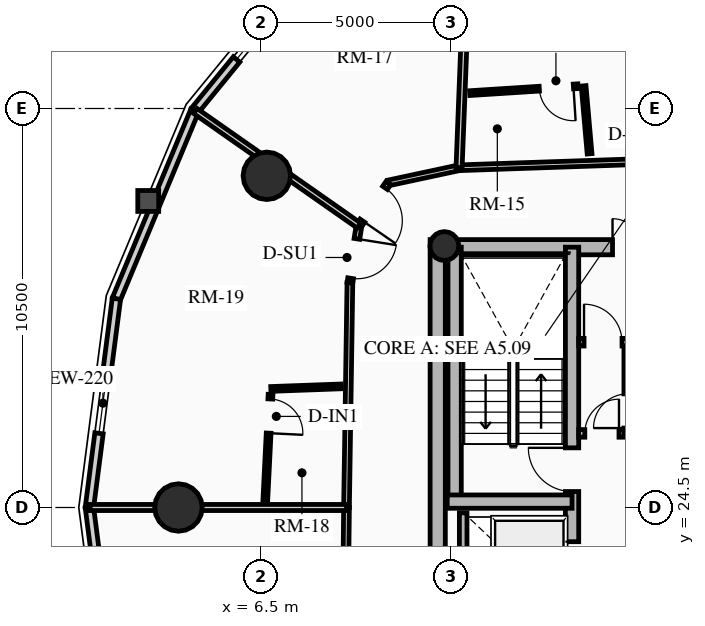
"""IFC4 building model, lengths in metres.
Left out: names, types, materials, properties, quantities, classifications, styles, units other than length and angle.
Written with IfcOpenShell. Run it as: python <this file> out.ifc"""

import sys

from ifc_helpers import new_model, si_unit, direction, frame, frame_2d, origin, origin_2d, place, context, subcontext, project, spatial, rectangle, circle, hollow_circle, extrude, source, transform, mapped, element, fill, save


model = new_model("IFC4")
c1 = context("Model", 3, precision=1e-05, world=origin(), true_north=direction((0.0, 1.0)))
c2 = subcontext(c1, "Body", "Model", "MODEL_VIEW")
j1 = project(units=[si_unit("LENGTHUNIT", "METRE"), si_unit("PLANEANGLEUNIT", "RADIAN")], contexts=[c1])
p1 = place(None, origin())
s1 = spatial("IfcSite", under=j1, at=p1, CompositionType="ELEMENT")
p2 = place(p1, origin())
s2 = spatial("IfcBuilding", under=s1, at=p2, CompositionType="ELEMENT")
p3 = place(p2, frame((0.0, 0.0, 154.51)))
s3 = spatial("IfcBuildingStorey", under=s2, at=p3, CompositionType="ELEMENT", Elevation=154.51)
p4 = place(p3, frame((11.15, 17.45, 0.0), z_axis=(0.0, 0.0, 1.0), x_axis=(0.0, 1.0, 0.0)))
e1 = element("IfcWall", 1, at=p4, inside=s3, PredefinedType="SHEAR", context=c2, shape_type="SweptSolid", body=[
    extrude(rectangle(XDim=14.1, YDim=0.4, at=frame_2d((7.05, 0.0))), origin(), (0.0, 0.0, 1.0), 2.91),
])
p5 = place(p3, frame((11.15, 31.35, 0.0), z_axis=(0.0, 0.0, 1.0), x_axis=(1.0, 0.0, 0.0)))
e2 = element("IfcWall", 2, at=p5, inside=s3, PredefinedType="SHEAR", context=c2, shape_type="SweptSolid", body=[
    extrude(rectangle(XDim=10.7, YDim=0.4, at=frame_2d((5.35, 0.0))), origin(), (0.0, 0.0, 1.0), 2.91),
])
m1 = source(origin(), c2, "Body", "SweptSolid", [
    extrude(rectangle(XDim=1.5, YDim=2.02, at=frame_2d((0.75, 1.01))), frame((0.0, 0.21, 0.0), z_axis=(0.0, -1.0, 0.0), x_axis=(1.0, 0.0, 0.0)), (0.0, 0.0, 1.0), 0.42),
])
p6 = place(p5, frame((4.6, 0.0, 0.0)))
e3 = element("IfcOpeningElement", 3, at=p6, cuts=e2, PredefinedType="OPENING", context=c2, shape_type="MappedRepresentation", body=[
    mapped(m1, transform((0.0, 0.0, 0.0), x_axis=(1.0, 0.0, 0.0), y_axis=(0.0, 1.0, 0.0), z_axis=(0.0, 0.0, 1.0), scale=1.0)),
])
p7 = place(p3, frame((14.685, 17.65, 0.0), z_axis=(0.0, 0.0, 1.0), x_axis=(0.0, 1.0, 0.0)))
e4 = element("IfcWall", 4, at=p7, inside=s3, PredefinedType="SHEAR", context=c2, shape_type="SweptSolid", body=[
    extrude(rectangle(XDim=13.7, YDim=0.35, at=frame_2d((6.85, 0.0))), origin(), (0.0, 0.0, 1.0), 2.91),
])
m2 = source(origin(), c2, "Body", "SweptSolid", [
    extrude(rectangle(XDim=1.1, YDim=2.015, at=frame_2d((0.55, 1.007))), frame((0.0, 0.185, 0.0), z_axis=(0.0, -1.0, 0.0), x_axis=(1.0, 0.0, 0.0)), (0.0, 0.0, 1.0), 0.37),
])
p8 = place(p7, frame((4.85, 0.0, 0.0)))
e5 = element("IfcOpeningElement", 5, at=p8, cuts=e4, PredefinedType="OPENING", context=c2, shape_type="MappedRepresentation", body=[
    mapped(m2, transform((0.0, 0.0, 0.0), x_axis=(1.0, 0.0, 0.0), y_axis=(0.0, 1.0, 0.0), z_axis=(0.0, 0.0, 1.0), scale=1.0)),
])
p9 = place(p7, frame((0.625, 0.0, 0.0)))
e6 = element("IfcOpeningElement", 6, at=p9, cuts=e4, PredefinedType="OPENING", context=c2, shape_type="MappedRepresentation", body=[
    mapped(m2, transform((0.0, 0.0, 0.0), x_axis=(1.0, 0.0, 0.0), y_axis=(0.0, 1.0, 0.0), z_axis=(0.0, 0.0, 1.0), scale=1.0)),
])
p10 = place(p7, frame((2.625, 0.0, 0.0)))
e7 = element("IfcOpeningElement", 7, at=p10, cuts=e4, PredefinedType="OPENING", context=c2, shape_type="MappedRepresentation", body=[
    mapped(m2, transform((0.0, 0.0, 0.0), x_axis=(1.0, 0.0, 0.0), y_axis=(0.0, 1.0, 0.0), z_axis=(0.0, 0.0, 1.0), scale=1.0)),
])
m3 = source(origin(), c2, "Body", "SweptSolid", [
    extrude(rectangle(XDim=1.15, YDim=2.02, at=frame_2d((0.575, 1.01))), frame((0.0, 0.185, 0.0), z_axis=(0.0, -1.0, 0.0), x_axis=(1.0, 0.0, 0.0)), (0.0, 0.0, 1.0), 0.37),
])
p11 = place(p7, frame((7.27, 0.0, 0.0)))
e8 = element("IfcOpeningElement", 8, at=p11, cuts=e4, PredefinedType="OPENING", context=c2, shape_type="MappedRepresentation", body=[
    mapped(m3, transform((0.0, 0.0, 0.0), x_axis=(1.0, 0.0, 0.0), y_axis=(0.0, 1.0, 0.0), z_axis=(0.0, 0.0, 1.0), scale=1.0)),
])
p12 = place(p3, frame((11.595, 24.655, 0.0), z_axis=(0.0, 0.0, 1.0), x_axis=(0.0, 1.0, 0.0)))
e9 = element("IfcWall", 9, at=p12, inside=s3, PredefinedType="SHEAR", context=c2, shape_type="SweptSolid", body=[
    extrude(rectangle(XDim=6.695, YDim=0.35, at=frame_2d((3.348, 0.0))), origin(), (0.0, 0.0, 1.0), 2.91),
])
p13 = place(p3, frame((11.4, 24.655, 0.0), z_axis=(0.0, 0.0, 1.0), x_axis=(1.0, 0.0, 0.0)))
e10 = element("IfcWall", 10, at=p13, inside=s3, PredefinedType="SHEAR", context=c2, shape_type="SweptSolid", body=[
    extrude(rectangle(XDim=3.285, YDim=0.35, at=frame_2d((1.643, 0.0))), origin(), (0.0, 0.0, 1.0), 2.91),
])
p14 = place(p3, frame((11.325, 31.38, 0.0), z_axis=(0.0, 0.0, 1.0), x_axis=(1.0, 0.0, 0.0)))
e11 = element("IfcColumn", 11, at=p14, inside=s3, PredefinedType="COLUMN", context=c2, shape_type="SweptSolid", body=[
    extrude(hollow_circle(Radius=0.38, WallThickness=0.032, at=origin_2d()), origin(), (0.0, 0.0, 1.0), 2.91),
])
for number, where, z_axis, x_axis in (
    (12, (6.653, 33.229, 0.0), (0.0, 0.0, 1.0), (1.0, 0.0, 0.0)),
    (13, (4.328, 24.5, 0.0), (0.0, 0.0, 1.0), (1.0, 0.0, 0.0)),
):
    element("IfcColumn", number, at=place(p3, frame(where, z_axis=z_axis, x_axis=x_axis)), inside=s3, PredefinedType="USERDEFINED", context=c2, shape_type="SweptSolid", body=[
        extrude(circle(Radius=0.625, at=origin_2d()), origin(), (0.0, 0.0, 1.0), 2.91),
    ])
p15 = place(p3, frame((4.757, 34.945, 0.0), z_axis=(0.0, 0.0, 1.0), x_axis=(0.632598524901, 0.774479894053, 0.0)))
e14 = element("IfcWall", 14, at=p15, inside=s3, PredefinedType="SOLIDWALL", context=c2, shape_type="SweptSolid", body=[
    extrude(rectangle(XDim=5.076, YDim=0.22, at=frame_2d((2.538, 0.0))), origin(), (0.0, 0.0, 1.0), 2.245),
])
m4 = source(origin(), c2, "Body", "SweptSolid", [
    extrude(rectangle(XDim=1.6, YDim=1.3, at=frame_2d((0.8, 0.65))), frame((0.0, 0.12, 0.0), z_axis=(0.0, -1.0, 0.0), x_axis=(1.0, 0.0, 0.0)), (0.0, 0.0, 1.0), 0.24),
])
p16 = place(p15, frame((1.738, 0.0, 0.65)))
e15 = element("IfcOpeningElement", 15, at=p16, cuts=e14, PredefinedType="OPENING", context=c2, shape_type="MappedRepresentation", body=[
    mapped(m4, transform((0.0, 0.0, 0.0), x_axis=(1.0, 0.0, 0.0), y_axis=(0.0, 1.0, 0.0), z_axis=(0.0, 0.0, 1.0), scale=1.0)),
])
p17 = place(p3, frame((2.695, 29.991, 0.0), z_axis=(0.0, 0.0, 1.0), x_axis=(0.384259959969, 0.923224936386, 0.0)))
e16 = element("IfcWall", 16, at=p17, inside=s3, PredefinedType="SOLIDWALL", context=c2, shape_type="SweptSolid", body=[
    extrude(rectangle(XDim=5.365, YDim=0.22, at=frame_2d((2.683, 0.0))), origin(), (0.0, 0.0, 1.0), 2.245),
])
p18 = place(p3, frame((1.985, 24.5, 0.0), z_axis=(0.0, 0.0, 1.0), x_axis=(0.128266533912, 0.991739732126, 0.0)))
e17 = element("IfcWall", 17, at=p18, inside=s3, PredefinedType="SOLIDWALL", context=c2, shape_type="SweptSolid", body=[
    extrude(rectangle(XDim=5.537, YDim=0.22, at=frame_2d((2.769, 0.0))), origin(), (0.0, 0.0, 1.0), 2.245),
])
p19 = place(p18, frame((1.968, 0.0, 0.65)))
e18 = element("IfcOpeningElement", 18, at=p19, cuts=e17, PredefinedType="OPENING", context=c2, shape_type="MappedRepresentation", body=[
    mapped(m4, transform((0.0, 0.0, 0.0), x_axis=(1.0, 0.0, 0.0), y_axis=(0.0, 1.0, 0.0), z_axis=(0.0, 0.0, 1.0), scale=1.0)),
])
p20 = place(p3, frame((2.695, 19.009, 0.0), z_axis=(0.0, 0.0, 1.0), x_axis=(-0.128266533912, 0.991739732126, 0.0)))
e19 = element("IfcWall", 19, at=p20, inside=s3, PredefinedType="SOLIDWALL", context=c2, shape_type="SweptSolid", body=[
    extrude(rectangle(XDim=5.537, YDim=0.22, at=frame_2d((2.769, 0.0))), origin(), (0.0, 0.0, 1.0), 2.245),
])
p21 = place(p3, frame((11.82, 21.92, 0.0), z_axis=(0.0, 0.0, 1.0), x_axis=(0.0, 1.0, 0.0)))
e20 = element("IfcWall", 20, at=p21, inside=s3, PredefinedType="SHEAR", context=c2, shape_type="SweptSolid", body=[
    extrude(rectangle(XDim=2.44, YDim=0.2, at=frame_2d((1.22, 0.0))), origin(), (0.0, 0.0, 1.0), 2.91),
])
p22 = place(p3, frame((14.86, 26.45, 0.0), z_axis=(0.0, 0.0, 1.0), x_axis=(1.0, 0.0, 0.0)))
e21 = element("IfcWall", 21, at=p22, inside=s3, PredefinedType="PARTITIONING", context=c2, shape_type="SweptSolid", body=[
    extrude(rectangle(XDim=3.28, YDim=0.2, at=frame_2d((1.64, 0.0))), origin(), (0.0, 0.0, 1.0), 2.675),
])
m5 = source(origin(), c2, "Body", "SweptSolid", [
    extrude(rectangle(XDim=0.9, YDim=2.005, at=frame_2d((0.45, 1.002))), frame((0.0, 0.11, 0.0), z_axis=(0.0, -1.0, 0.0), x_axis=(1.0, 0.0, 0.0)), (0.0, 0.0, 1.0), 0.22),
])
p23 = place(p22, frame((0.16, 0.0, 0.0)))
e22 = element("IfcOpeningElement", 22, at=p23, cuts=e21, PredefinedType="OPENING", context=c2, shape_type="MappedRepresentation", body=[
    mapped(m5, transform((0.0, 0.0, 0.0), x_axis=(1.0, 0.0, 0.0), y_axis=(0.0, 1.0, 0.0), z_axis=(0.0, 0.0, 1.0), scale=1.0)),
])
p24 = place(p3, frame((16.15, 26.45, 0.0), z_axis=(0.0, 0.0, 1.0), x_axis=(0.0, 1.0, 0.0)))
e23 = element("IfcWall", 23, at=p24, inside=s3, PredefinedType="PARTITIONING", context=c2, shape_type="SweptSolid", body=[
    extrude(rectangle(XDim=2.4, YDim=0.2, at=frame_2d((1.2, 0.0))), origin(), (0.0, 0.0, 1.0), 2.675),
])
p25 = place(p24, frame((0.14, 0.0, 0.0)))
e24 = element("IfcOpeningElement", 24, at=p25, cuts=e23, PredefinedType="OPENING", context=c2, shape_type="MappedRepresentation", body=[
    mapped(m5, transform((0.0, 0.0, 0.0), x_axis=(1.0, 0.0, 0.0), y_axis=(0.0, 1.0, 0.0), z_axis=(0.0, 0.0, 1.0), scale=1.0)),
])
p26 = place(p3, frame((14.86, 28.85, 0.0), z_axis=(0.0, 0.0, 1.0), x_axis=(1.0, 0.0, 0.0)))
e25 = element("IfcWall", 25, at=p26, inside=s3, PredefinedType="PARTITIONING", context=c2, shape_type="SweptSolid", body=[
    extrude(rectangle(XDim=3.28, YDim=0.2, at=frame_2d((1.64, 0.0))), origin(), (0.0, 0.0, 1.0), 2.675),
])
m6 = source(origin(), c2, "Body", "SweptSolid", [
    extrude(rectangle(XDim=1.0, YDim=2.015, at=frame_2d((0.5, 1.007))), frame((0.0, 0.11, 0.0), z_axis=(0.0, -1.0, 0.0), x_axis=(1.0, 0.0, 0.0)), (0.0, 0.0, 1.0), 0.22),
])
p27 = place(p26, frame((0.14, 0.0, 0.0)))
e26 = element("IfcOpeningElement", 26, at=p27, cuts=e25, PredefinedType="OPENING", context=c2, shape_type="MappedRepresentation", body=[
    mapped(m6, transform((0.0, 0.0, 0.0), x_axis=(1.0, 0.0, 0.0), y_axis=(0.0, 1.0, 0.0), z_axis=(0.0, 0.0, 1.0), scale=1.0)),
])
p28 = place(p26, frame((2.05, 0.0, 0.0)))
e27 = element("IfcOpeningElement", 27, at=p28, cuts=e25, PredefinedType="OPENING", context=c2, shape_type="MappedRepresentation", body=[
    mapped(m5, transform((0.0, 0.0, 0.0), x_axis=(1.0, 0.0, 0.0), y_axis=(0.0, 1.0, 0.0), z_axis=(0.0, 0.0, 1.0), scale=1.0)),
])
p29 = place(p3, frame((18.112, 33.659, 0.0), z_axis=(0.0, 0.0, 1.0), x_axis=(-0.999413895918, -0.034232508622, 0.0)))
e28 = element("IfcWall", 28, at=p29, inside=s3, PredefinedType="PARTITIONING", context=c2, shape_type="SweptSolid", body=[
    extrude(rectangle(XDim=6.404, YDim=0.15, at=frame_2d((3.202, 0.0))), origin(), (0.0, 0.0, 1.0), 2.245),
])
p30 = place(p3, frame((11.712, 33.44, 0.0), z_axis=(0.0, 0.0, 1.0), x_axis=(-0.977753514213, -0.209757158265, 0.0)))
e29 = element("IfcWall", 29, at=p30, inside=s3, PredefinedType="PARTITIONING", context=c2, shape_type="SweptSolid", body=[
    extrude(rectangle(XDim=1.901, YDim=0.15, at=frame_2d((0.95, 0.0))), origin(), (0.0, 0.0, 1.0), 2.245),
])
p31 = place(p3, frame((9.853, 33.042, 0.0), z_axis=(0.0, 0.0, 1.0), x_axis=(-0.567189283521, -0.823587467522, 0.0)))
e30 = element("IfcWall", 30, at=p31, inside=s3, PredefinedType="PARTITIONING", context=c2, shape_type="SweptSolid", body=[
    extrude(rectangle(XDim=1.365, YDim=0.15, at=frame_2d((0.682, 0.0))), origin(), (0.0, 0.0, 1.0), 2.245),
])
m7 = source(origin(), c2, "Body", "SweptSolid", [
    extrude(rectangle(XDim=1.05, YDim=2.015, at=frame_2d((0.525, 1.007))), frame((0.0, 0.085, 0.0), z_axis=(0.0, -1.0, 0.0), x_axis=(1.0, 0.0, 0.0)), (0.0, 0.0, 1.0), 0.17),
])
p32 = place(p31, frame((0.157, 0.0, 0.0)))
e31 = element("IfcOpeningElement", 31, at=p32, cuts=e30, PredefinedType="OPENING", context=c2, shape_type="MappedRepresentation", body=[
    mapped(m7, transform((0.0, 0.0, 0.0), x_axis=(1.0, 0.0, 0.0), y_axis=(0.0, 1.0, 0.0), z_axis=(0.0, 0.0, 1.0), scale=1.0)),
])
p33 = place(p3, frame((9.079, 31.918, 0.0), z_axis=(0.0, 0.0, 1.0), x_axis=(-0.15742775293, -0.987530507178, 0.0)))
e32 = element("IfcWall", 32, at=p33, inside=s3, PredefinedType="PARTITIONING", context=c2, shape_type="SweptSolid", body=[
    extrude(rectangle(XDim=1.523, YDim=0.15, at=frame_2d((0.761, 0.0))), origin(), (0.0, 0.0, 1.0), 2.245),
])
p34 = place(p33, frame((0.353, 0.0, 0.0)))
e33 = element("IfcOpeningElement", 33, at=p34, cuts=e32, PredefinedType="OPENING", context=c2, shape_type="MappedRepresentation", body=[
    mapped(m7, transform((0.0, 0.0, 0.0), x_axis=(1.0, 0.0, 0.0), y_axis=(0.0, 1.0, 0.0), z_axis=(0.0, 0.0, 1.0), scale=1.0)),
])
p35 = place(p3, frame((8.84, 30.414, 0.0), z_axis=(0.0, 0.0, 1.0), x_axis=(-0.01514915101, -0.999885245027, 0.0)))
e34 = element("IfcWall", 34, at=p35, inside=s3, PredefinedType="PARTITIONING", context=c2, shape_type="SweptSolid", body=[
    extrude(rectangle(XDim=5.915, YDim=0.15, at=frame_2d((2.957, 0.0))), origin(), (0.0, 0.0, 1.0), 2.675),
])
p36 = place(p3, frame((8.75, 24.5, 0.0), z_axis=(0.0, 0.0, 1.0), x_axis=(-0.01076642715, -0.999942040344, 0.0)))
e35 = element("IfcWall", 35, at=p36, inside=s3, PredefinedType="PARTITIONING", context=c2, shape_type="SweptSolid", body=[
    extrude(rectangle(XDim=6.032, YDim=0.15, at=frame_2d((3.016, 0.0))), origin(), (0.0, 0.0, 1.0), 2.245),
])
p37 = place(p3, frame((11.712, 33.44, 0.0), z_axis=(0.0, 0.0, 1.0), x_axis=(0.038892064024, 0.999243417469, 0.0)))
e36 = element("IfcWall", 36, at=p37, inside=s3, PredefinedType="PARTITIONING", context=c2, shape_type="SweptSolid", body=[
    extrude(rectangle(XDim=7.947, YDim=0.16, at=frame_2d((3.974, 0.0))), origin(), (0.0, 0.0, 1.0), 2.245),
])
p38 = place(p3, frame((9.079, 31.918, 0.0), z_axis=(0.0, 0.0, 1.0), x_axis=(-0.819135909075, 0.573599479135, 0.0)))
e37 = element("IfcWall", 37, at=p38, inside=s3, PredefinedType="PARTITIONING", context=c2, shape_type="SweptSolid", body=[
    extrude(rectangle(XDim=5.257, YDim=0.16, at=frame_2d((2.628, 0.0))), origin(), (0.0, 0.0, 1.0), 2.245),
])
p39 = place(p3, frame((8.75, 24.5, 0.0), z_axis=(0.0, 0.0, 1.0), x_axis=(-1.0, 0.0, 0.0)))
e38 = element("IfcWall", 38, at=p39, inside=s3, PredefinedType="PARTITIONING", context=c2, shape_type="SweptSolid", body=[
    extrude(rectangle(XDim=6.745, YDim=0.16, at=frame_2d((3.373, 0.0))), origin(), (0.0, 0.0, 1.0), 2.245),
])
p40 = place(p3, frame((15.146, 33.807, 0.0), z_axis=(0.0, 0.0, 1.0), x_axis=(-0.087433462003, 0.996170361797, 0.0)))
e39 = element("IfcWall", 39, at=p40, inside=s3, PredefinedType="PARTITIONING", context=c2, shape_type="SweptSolid", body=[
    extrude(rectangle(XDim=1.795, YDim=0.125, at=frame_2d((0.898, 0.0))), origin(), (0.0, 0.0, 1.0), 2.675),
])
p41 = place(p3, frame((14.841, 35.586, 0.0), z_axis=(0.0, 0.0, 1.0), x_axis=(-0.997963636416, -0.063785424599, 0.0)))
e40 = element("IfcWall", 40, at=p41, inside=s3, PredefinedType="PARTITIONING", context=c2, shape_type="SweptSolid", body=[
    extrude(rectangle(XDim=2.852, YDim=0.125, at=frame_2d((1.426, 0.0))), origin(), (0.0, 0.0, 1.0), 2.245),
])
m8 = source(origin(), c2, "Body", "SweptSolid", [
    extrude(rectangle(XDim=0.9, YDim=2.005, at=frame_2d((0.45, 1.002))), frame((0.0, 0.073, 0.0), z_axis=(0.0, -1.0, 0.0), x_axis=(1.0, 0.0, 0.0)), (0.0, 0.0, 1.0), 0.145),
])
p42 = place(p41, frame((0.12, 0.0, 0.0)))
e41 = element("IfcOpeningElement", 41, at=p42, cuts=e40, PredefinedType="OPENING", context=c2, shape_type="MappedRepresentation", body=[
    mapped(m8, transform((0.0, 0.0, 0.0), x_axis=(1.0, 0.0, 0.0), y_axis=(0.0, 1.0, 0.0), z_axis=(0.0, 0.0, 1.0), scale=1.0)),
])
p43 = place(p3, frame((8.606, 27.687, 0.0), z_axis=(0.0, 0.0, 1.0), x_axis=(-0.999349834195, -0.036054249337, 0.0)))
e42 = element("IfcWall", 42, at=p43, inside=s3, PredefinedType="PARTITIONING", context=c2, shape_type="SweptSolid", body=[
    extrude(rectangle(XDim=1.849, YDim=0.125, at=frame_2d((0.924, 0.0))), origin(), (0.0, 0.0, 1.0), 2.675),
])
p44 = place(p3, frame((6.751, 27.475, 0.0), z_axis=(0.0, 0.0, 1.0), x_axis=(-0.049591166042, -0.998769601185, 0.0)))
e43 = element("IfcWall", 43, at=p44, inside=s3, PredefinedType="PARTITIONING", context=c2, shape_type="SweptSolid", body=[
    extrude(rectangle(XDim=2.777, YDim=0.125, at=frame_2d((1.388, 0.0))), origin(), (0.0, 0.0, 1.0), 2.675),
])
p45 = place(p44, frame((0.12, 0.0, 0.0)))
e44 = element("IfcOpeningElement", 44, at=p45, cuts=e43, PredefinedType="OPENING", context=c2, shape_type="MappedRepresentation", body=[
    mapped(m8, transform((0.0, 0.0, 0.0), x_axis=(1.0, 0.0, 0.0), y_axis=(0.0, 1.0, 0.0), z_axis=(0.0, 0.0, 1.0), scale=1.0)),
])
m9 = source(origin(), c2, "Body", "SweptSolid", [
    extrude(rectangle(XDim=1.6, YDim=1.3, at=frame_2d((0.8, 0.65))), frame((0.0, 0.03, 0.0), z_axis=(0.0, -1.0, 0.0), x_axis=(1.0, 0.0, 0.0)), (0.0, 0.0, 1.0), 0.06),
])
p46 = place(p16, origin())
e45 = element("IfcWindow", 45, at=p46, inside=s3, PartitioningType="SINGLE_PANEL", PredefinedType="WINDOW", context=c2, shape_type="MappedRepresentation", body=[
    mapped(m9, transform((0.0, 0.0, 0.0), x_axis=(1.0, 0.0, 0.0), y_axis=(0.0, 1.0, 0.0), z_axis=(0.0, 0.0, 1.0), scale=1.0)),
])
fill(e15, e45)
p47 = place(p19, origin())
e46 = element("IfcWindow", 46, at=p47, inside=s3, PartitioningType="SINGLE_PANEL", PredefinedType="WINDOW", context=c2, shape_type="MappedRepresentation", body=[
    mapped(m9, transform((0.0, 0.0, 0.0), x_axis=(1.0, 0.0, 0.0), y_axis=(0.0, 1.0, 0.0), z_axis=(0.0, 0.0, 1.0), scale=1.0)),
])
fill(e18, e46)
m10 = source(origin(), c2, "Body", "SweptSolid", [
    extrude(rectangle(XDim=1.1, YDim=2.015, at=frame_2d((0.55, 1.007))), frame((0.0, 0.025, 0.0), z_axis=(0.0, -1.0, 0.0), x_axis=(1.0, 0.0, 0.0)), (0.0, 0.0, 1.0), 0.05),
])
p48 = place(p8, origin())
e47 = element("IfcDoor", 47, at=p48, inside=s3, OperationType="SLIDING_TO_LEFT", PredefinedType="DOOR", context=c2, shape_type="MappedRepresentation", body=[
    mapped(m10, transform((0.0, 0.0, 0.0), x_axis=(1.0, 0.0, 0.0), y_axis=(0.0, 1.0, 0.0), z_axis=(0.0, 0.0, 1.0), scale=1.0)),
])
fill(e5, e47)
m11 = source(origin(), c2, "Body", "SweptSolid", [
    extrude(rectangle(XDim=1.15, YDim=2.02, at=frame_2d((0.575, 1.01))), frame((0.0, 0.025, 0.0), z_axis=(0.0, -1.0, 0.0), x_axis=(1.0, 0.0, 0.0)), (0.0, 0.0, 1.0), 0.05),
])
p49 = place(p11, origin())
e48 = element("IfcDoor", 48, at=p49, inside=s3, OperationType="SINGLE_SWING_RIGHT", PredefinedType="DOOR", context=c2, shape_type="MappedRepresentation", body=[
    mapped(m11, transform((0.0, 0.0, 0.0), x_axis=(1.0, 0.0, 0.0), y_axis=(0.0, 1.0, 0.0), z_axis=(0.0, 0.0, 1.0), scale=1.0)),
])
fill(e8, e48)
m12 = source(origin(), c2, "Body", "SweptSolid", [
    extrude(rectangle(XDim=1.5, YDim=2.02, at=frame_2d((0.75, 1.01))), frame((0.0, 0.025, 0.0), z_axis=(0.0, -1.0, 0.0), x_axis=(1.0, 0.0, 0.0)), (0.0, 0.0, 1.0), 0.05),
])
p50 = place(p6, origin())
e49 = element("IfcDoor", 49, at=p50, inside=s3, OperationType="DOUBLE_DOOR_SINGLE_SWING", PredefinedType="DOOR", context=c2, shape_type="MappedRepresentation", body=[
    mapped(m12, transform((0.0, 0.0, 0.0), x_axis=(1.0, 0.0, 0.0), y_axis=(0.0, 1.0, 0.0), z_axis=(0.0, 0.0, 1.0), scale=1.0)),
])
fill(e3, e49)
m13 = source(origin(), c2, "Body", "SweptSolid", [
    extrude(rectangle(XDim=0.9, YDim=2.005, at=frame_2d((0.45, 1.002))), frame((0.0, 0.025, 0.0), z_axis=(0.0, -1.0, 0.0), x_axis=(1.0, 0.0, 0.0)), (0.0, 0.0, 1.0), 0.05),
])
p51 = place(p23, origin())
e50 = element("IfcDoor", 50, at=p51, inside=s3, OperationType="SINGLE_SWING_RIGHT", PredefinedType="DOOR", context=c2, shape_type="MappedRepresentation", body=[
    mapped(m13, transform((0.0, 0.0, 0.0), x_axis=(1.0, 0.0, 0.0), y_axis=(0.0, 1.0, 0.0), z_axis=(0.0, 0.0, 1.0), scale=1.0)),
])
fill(e22, e50)
m14 = source(origin(), c2, "Body", "SweptSolid", [
    extrude(rectangle(XDim=1.0, YDim=2.015, at=frame_2d((0.5, 1.007))), frame((0.0, 0.025, 0.0), z_axis=(0.0, -1.0, 0.0), x_axis=(1.0, 0.0, 0.0)), (0.0, 0.0, 1.0), 0.05),
])
p52 = place(p27, origin())
e51 = element("IfcDoor", 51, at=p52, inside=s3, OperationType="SINGLE_SWING_LEFT", PredefinedType="DOOR", context=c2, shape_type="MappedRepresentation", body=[
    mapped(m14, transform((0.0, 0.0, 0.0), x_axis=(1.0, 0.0, 0.0), y_axis=(0.0, 1.0, 0.0), z_axis=(0.0, 0.0, 1.0), scale=1.0)),
])
fill(e26, e51)
p53 = place(p42, origin())
e52 = element("IfcDoor", 52, at=p53, inside=s3, OperationType="SINGLE_SWING_LEFT", PredefinedType="DOOR", context=c2, shape_type="MappedRepresentation", body=[
    mapped(m13, transform((0.0, 0.0, 0.0), x_axis=(1.0, 0.0, 0.0), y_axis=(0.0, 1.0, 0.0), z_axis=(0.0, 0.0, 1.0), scale=1.0)),
])
fill(e41, e52)
m15 = source(origin(), c2, "Body", "SweptSolid", [
    extrude(rectangle(XDim=1.05, YDim=2.015, at=frame_2d((0.525, 1.007))), frame((0.0, 0.025, 0.0), z_axis=(0.0, -1.0, 0.0), x_axis=(1.0, 0.0, 0.0)), (0.0, 0.0, 1.0), 0.05),
])
p54 = place(p32, origin())
e53 = element("IfcDoor", 53, at=p54, inside=s3, OperationType="SINGLE_SWING_RIGHT", PredefinedType="DOOR", context=c2, shape_type="MappedRepresentation", body=[
    mapped(m15, transform((0.0, 0.0, 0.0), x_axis=(1.0, 0.0, 0.0), y_axis=(0.0, 1.0, 0.0), z_axis=(0.0, 0.0, 1.0), scale=1.0)),
])
fill(e31, e53)
p55 = place(p34, origin())
e54 = element("IfcDoor", 54, at=p55, inside=s3, OperationType="SINGLE_SWING_LEFT", PredefinedType="DOOR", context=c2, shape_type="MappedRepresentation", body=[
    mapped(m15, transform((0.0, 0.0, 0.0), x_axis=(1.0, 0.0, 0.0), y_axis=(0.0, 1.0, 0.0), z_axis=(0.0, 0.0, 1.0), scale=1.0)),
])
fill(e33, e54)
p56 = place(p45, origin())
e55 = element("IfcDoor", 55, at=p56, inside=s3, OperationType="SINGLE_SWING_RIGHT", PredefinedType="DOOR", context=c2, shape_type="MappedRepresentation", body=[
    mapped(m13, transform((0.0, 0.0, 0.0), x_axis=(1.0, 0.0, 0.0), y_axis=(0.0, 1.0, 0.0), z_axis=(0.0, 0.0, 1.0), scale=1.0)),
])
fill(e44, e55)
save(model, sys.argv[1])
